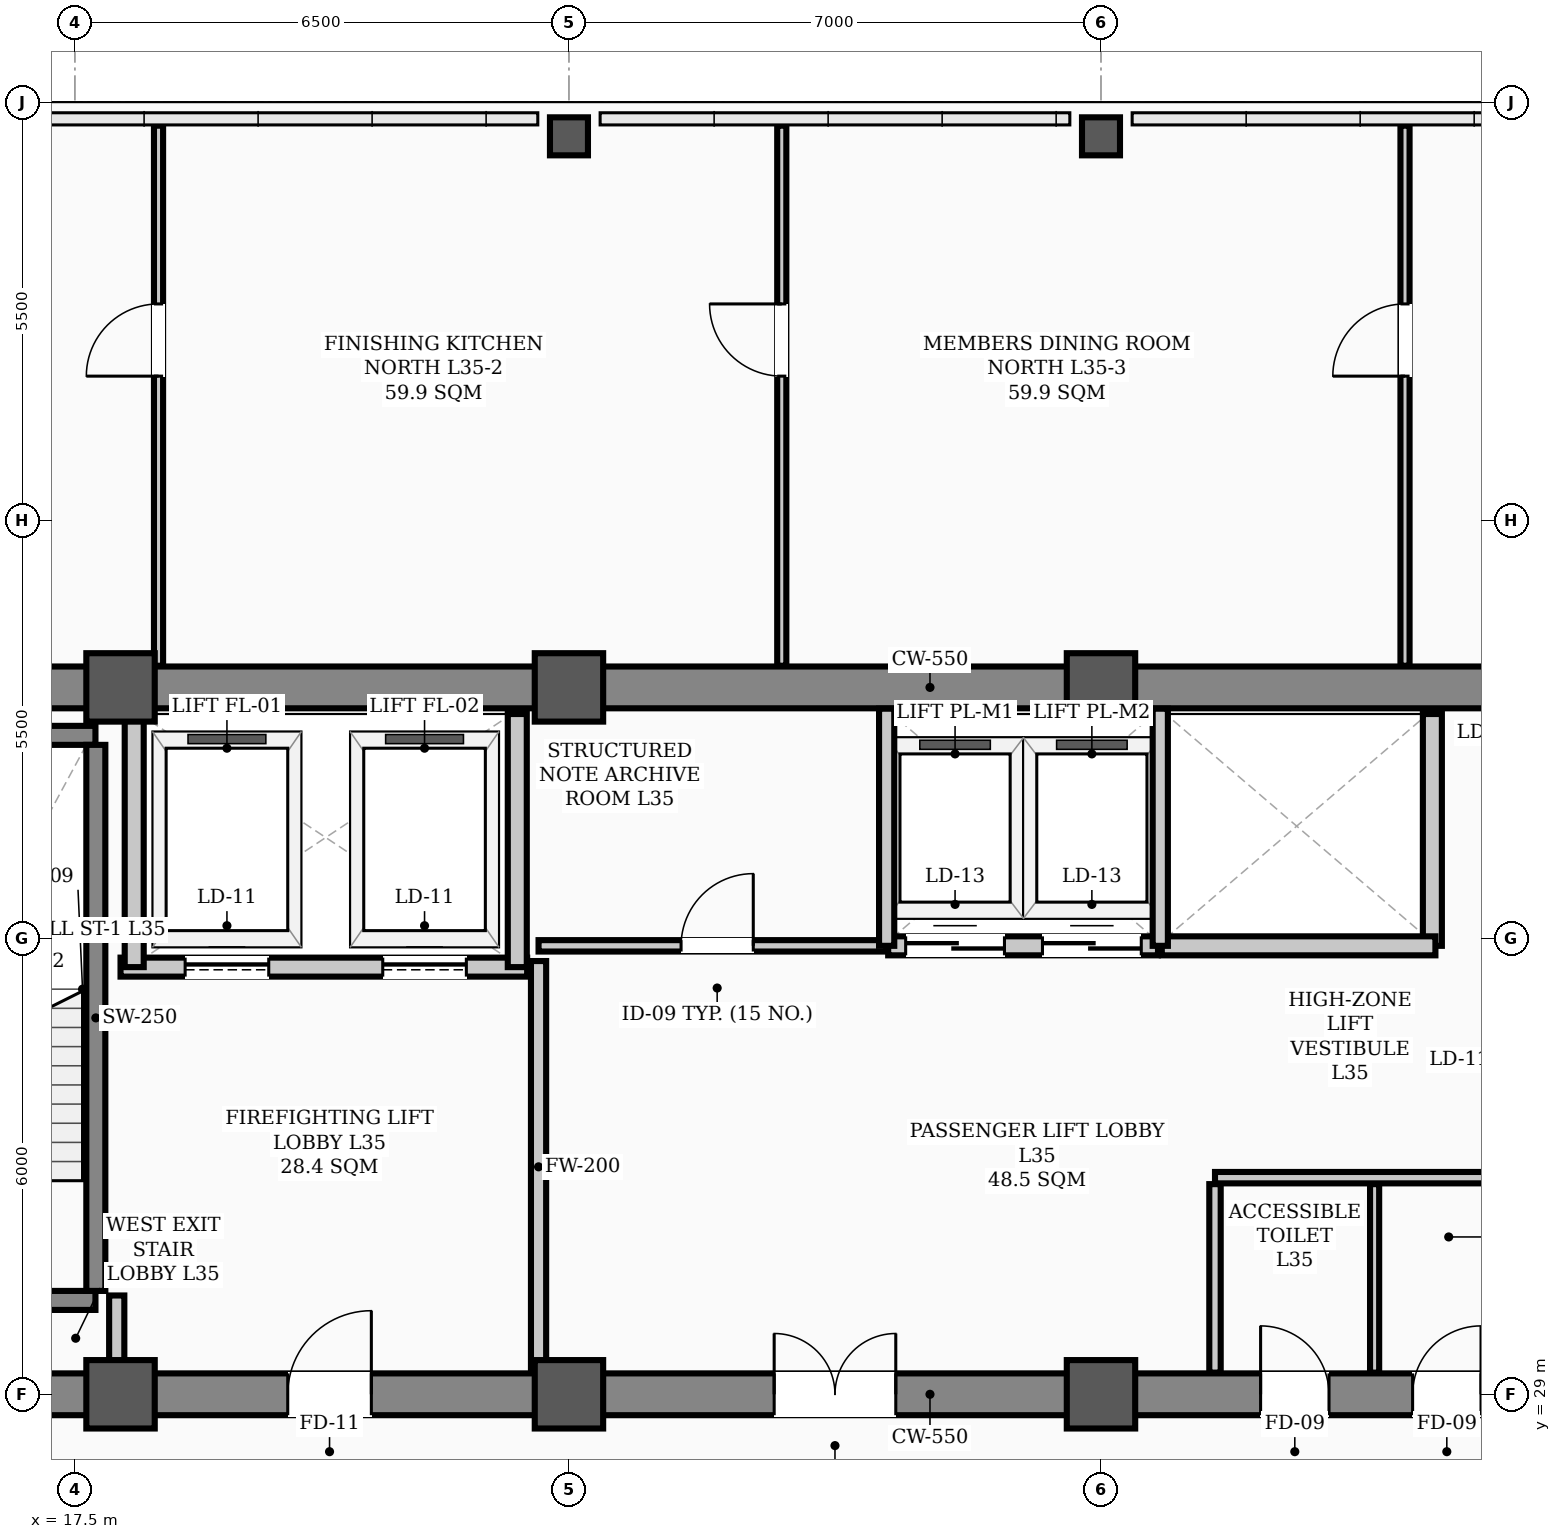
"""IFC4 building model, lengths in metres.
Left out: names, types, materials, properties, quantities, classifications, styles, units other than length and angle.
Written with IfcOpenShell. Run it as: python <this file> out.ifc"""

import sys

from ifc_helpers import new_model, si_unit, direction, frame, frame_2d, origin, origin_2d, place, context, subcontext, project, spatial, rectangle, hollow_rectangle, extrude, element, fill, save


model = new_model("IFC4")
c1 = context("Model", 3, precision=1e-05, world=origin(), true_north=direction((0.0, 1.0)))
c2 = subcontext(c1, "Body", "Model", "MODEL_VIEW")
j1 = project(units=[si_unit("LENGTHUNIT", "METRE"), si_unit("PLANEANGLEUNIT", "RADIAN")], contexts=[c1])
p1 = place(None, origin())
s1 = spatial("IfcSite", under=j1, at=p1, CompositionType="ELEMENT")
p2 = place(p1, origin())
s2 = spatial("IfcBuilding", under=s1, at=p2, CompositionType="ELEMENT")
p3 = place(p2, frame((0.0, 0.0, 142.2)))
s3 = spatial("IfcBuildingStorey", under=s2, at=p3, CompositionType="ELEMENT", Elevation=142.2)
for number, where, z_axis, x_axis in (
    (1, (18.1, 29.0, 0.0), (0.0, 0.0, 1.0), (1.0, 0.0, 0.0)),
    (2, (18.1, 38.3, 0.0), (0.0, 0.0, 1.0), (1.0, 0.0, 0.0)),
    (3, (24.0, 29.0, 0.0), (0.0, 0.0, 1.0), (1.0, 0.0, 0.0)),
    (4, (24.0, 38.3, 0.0), (0.0, 0.0, 1.0), (1.0, 0.0, 0.0)),
    (5, (31.0, 29.0, 0.0), (0.0, 0.0, 1.0), (1.0, 0.0, 0.0)),
    (6, (31.0, 38.3, 0.0), (0.0, 0.0, 1.0), (1.0, 0.0, 0.0)),
):
    element("IfcColumn", number, at=place(p3, frame(where, z_axis=z_axis, x_axis=x_axis)), inside=s3, PredefinedType="COLUMN", context=c2, shape_type="SweptSolid", body=[
        extrude(hollow_rectangle(XDim=0.9, YDim=0.9, WallThickness=0.035, InnerFilletRadius=0.017, OuterFilletRadius=0.052, at=origin_2d()), origin(), (0.0, 0.0, 1.0), 3.9),
    ])
for number, where, z_axis, x_axis in (
    (7, (24.0, 45.55, 0.0), (0.0, 0.0, 1.0), (1.0, 0.0, 0.0)),
    (8, (31.0, 45.55, 0.0), (0.0, 0.0, 1.0), (1.0, 0.0, 0.0)),
):
    element("IfcColumn", number, at=place(p3, frame(where, z_axis=z_axis, x_axis=x_axis)), inside=s3, PredefinedType="COLUMN", context=c2, shape_type="SweptSolid", body=[
        extrude(hollow_rectangle(XDim=0.5, YDim=0.5, WallThickness=0.024, InnerFilletRadius=0.012, OuterFilletRadius=0.036, at=origin_2d()), origin(), (0.0, 0.0, 1.0), 3.9),
    ])
p4 = place(p3, frame((13.5, 29.0, 0.0), z_axis=(0.0, 0.0, 1.0), x_axis=(1.0, 0.0, 0.0)))
e9 = element("IfcWall", 9, at=p4, inside=s3, PredefinedType="SHEAR", context=c2, shape_type="SweptSolid", body=[
    extrude(rectangle(XDim=30.5, YDim=0.55, at=frame_2d((15.25, 0.0))), origin(), (0.0, 0.0, 1.0), 3.72),
])
p5 = place(p4, frame((1.75, 0.0, 0.0)))
e10 = element("IfcOpeningElement", 10, at=p5, cuts=e9, PredefinedType="OPENING", context=c2, shape_type="SweptSolid", body=[
    extrude(rectangle(XDim=1.1, YDim=2.08, at=frame_2d((0.55, 1.04))), frame((0.0, 0.285, 0.0), z_axis=(0.0, -1.0, 0.0), x_axis=(1.0, 0.0, 0.0)), (0.0, 0.0, 1.0), 0.57),
])
p6 = place(p4, frame((26.7, 0.0, 0.0)))
e11 = element("IfcOpeningElement", 11, at=p6, cuts=e9, PredefinedType="OPENING", context=c2, shape_type="SweptSolid", body=[
    extrude(rectangle(XDim=1.1, YDim=2.08, at=frame_2d((0.55, 1.04))), frame((0.0, 0.285, 0.0), z_axis=(0.0, -1.0, 0.0), x_axis=(1.0, 0.0, 0.0)), (0.0, 0.0, 1.0), 0.57),
])
p7 = place(p4, frame((6.8, 0.0, 0.0)))
e12 = element("IfcOpeningElement", 12, at=p7, cuts=e9, PredefinedType="OPENING", context=c2, shape_type="SweptSolid", body=[
    extrude(rectangle(XDim=1.1, YDim=2.08, at=frame_2d((0.55, 1.04))), frame((0.0, 0.285, 0.0), z_axis=(0.0, -1.0, 0.0), x_axis=(1.0, 0.0, 0.0)), (0.0, 0.0, 1.0), 0.57),
])
p8 = place(p4, frame((13.2, 0.0, 0.0)))
e13 = element("IfcOpeningElement", 13, at=p8, cuts=e9, PredefinedType="OPENING", context=c2, shape_type="SweptSolid", body=[
    extrude(rectangle(XDim=1.6, YDim=2.08, at=frame_2d((0.8, 1.04))), frame((0.0, 0.285, 0.0), z_axis=(0.0, -1.0, 0.0), x_axis=(1.0, 0.0, 0.0)), (0.0, 0.0, 1.0), 0.57),
])
p9 = place(p4, frame((19.6, 0.0, 0.0)))
e14 = element("IfcOpeningElement", 14, at=p9, cuts=e9, PredefinedType="OPENING", context=c2, shape_type="SweptSolid", body=[
    extrude(rectangle(XDim=0.9, YDim=2.08, at=frame_2d((0.45, 1.04))), frame((0.0, 0.285, 0.0), z_axis=(0.0, -1.0, 0.0), x_axis=(1.0, 0.0, 0.0)), (0.0, 0.0, 1.0), 0.57),
])
p10 = place(p4, frame((21.6, 0.0, 0.0)))
e15 = element("IfcOpeningElement", 15, at=p10, cuts=e9, PredefinedType="OPENING", context=c2, shape_type="SweptSolid", body=[
    extrude(rectangle(XDim=0.9, YDim=2.08, at=frame_2d((0.45, 1.04))), frame((0.0, 0.285, 0.0), z_axis=(0.0, -1.0, 0.0), x_axis=(1.0, 0.0, 0.0)), (0.0, 0.0, 1.0), 0.57),
])
p11 = place(p3, frame((13.5, 38.3, 0.0), z_axis=(0.0, 0.0, 1.0), x_axis=(1.0, 0.0, 0.0)))
e16 = element("IfcWall", 16, at=p11, inside=s3, PredefinedType="SHEAR", context=c2, shape_type="SweptSolid", body=[
    extrude(rectangle(XDim=30.5, YDim=0.55, at=frame_2d((15.25, 0.0))), origin(), (0.0, 0.0, 1.0), 3.72),
])
p12 = place(p3, frame((14.43, 30.235, 0.0), z_axis=(0.0, 0.0, 1.0), x_axis=(1.0, 0.0, 0.0)))
e17 = element("IfcWall", 17, at=p12, inside=s3, PredefinedType="STANDARD", context=c2, shape_type="SweptSolid", body=[
    extrude(rectangle(XDim=3.34, YDim=0.25, at=frame_2d((1.67, 0.0))), origin(), (0.0, 0.0, 1.0), 3.72),
])
p13 = place(p12, frame((1.1, 0.0, 0.0)))
e18 = element("IfcOpeningElement", 18, at=p13, cuts=e17, PredefinedType="OPENING", context=c2, shape_type="SweptSolid", body=[
    extrude(rectangle(XDim=1.1, YDim=2.08, at=frame_2d((0.55, 1.04))), frame((0.0, 0.135, 0.0), z_axis=(0.0, -1.0, 0.0), x_axis=(1.0, 0.0, 0.0)), (0.0, 0.0, 1.0), 0.27),
])
p14 = place(p3, frame((14.43, 37.669, 0.0), z_axis=(0.0, 0.0, 1.0), x_axis=(1.0, 0.0, 0.0)))
e19 = element("IfcWall", 19, at=p14, inside=s3, PredefinedType="STANDARD", context=c2, shape_type="SweptSolid", body=[
    extrude(rectangle(XDim=3.34, YDim=0.25, at=frame_2d((1.67, 0.0))), origin(), (0.0, 0.0, 1.0), 3.72),
])
p15 = place(p3, frame((17.775, 30.36, 0.0), z_axis=(0.0, 0.0, 1.0), x_axis=(0.0, 1.0, 0.0)))
e20 = element("IfcWall", 20, at=p15, inside=s3, PredefinedType="STANDARD", context=c2, shape_type="SweptSolid", body=[
    extrude(rectangle(XDim=7.184, YDim=0.25, at=frame_2d((3.592, 0.0))), origin(), (0.0, 0.0, 1.0), 3.72),
])
p16 = place(p3, frame((18.1, 34.62, 0.0), z_axis=(0.0, 0.0, 1.0), x_axis=(1.0, 0.0, 0.0)))
e21 = element("IfcWall", 21, at=p16, inside=s3, PredefinedType="STANDARD", context=c2, shape_type="SweptSolid", body=[
    extrude(rectangle(XDim=5.35, YDim=0.25, at=frame_2d((2.675, 0.0))), origin(), (0.0, 0.0, 1.0), 3.72),
])
p17 = place(p16, frame((0.85, 0.0, 0.0)))
e22 = element("IfcOpeningElement", 22, at=p17, cuts=e21, PredefinedType="OPENING", context=c2, shape_type="SweptSolid", body=[
    extrude(rectangle(XDim=1.1, YDim=2.08, at=frame_2d((0.55, 1.04))), frame((0.0, 0.135, 0.0), z_axis=(0.0, -1.0, 0.0), x_axis=(1.0, 0.0, 0.0)), (0.0, 0.0, 1.0), 0.27),
])
p18 = place(p16, frame((3.45, 0.0, 0.0)))
e23 = element("IfcOpeningElement", 23, at=p18, cuts=e21, PredefinedType="OPENING", context=c2, shape_type="SweptSolid", body=[
    extrude(rectangle(XDim=1.1, YDim=2.08, at=frame_2d((0.55, 1.04))), frame((0.0, 0.135, 0.0), z_axis=(0.0, -1.0, 0.0), x_axis=(1.0, 0.0, 0.0)), (0.0, 0.0, 1.0), 0.27),
])
for number, where, z_axis, x_axis in (
    (24, (18.28, 34.62, 0.0), (0.0, 0.0, 1.0), (0.0, 1.0, 0.0)),
    (25, (23.32, 34.62, 0.0), (0.0, 0.0, 1.0), (0.0, 1.0, 0.0)),
):
    element("IfcWall", number, at=place(p3, frame(where, z_axis=z_axis, x_axis=x_axis)), inside=s3, PredefinedType="STANDARD", context=c2, shape_type="SweptSolid", body=[
        extrude(rectangle(XDim=3.33, YDim=0.25, at=frame_2d((1.665, 0.0))), origin(), (0.0, 0.0, 1.0), 3.3),
    ])
p19 = place(p3, frame((35.36, 34.9, 0.0), z_axis=(0.0, 0.0, 1.0), x_axis=(0.0, 1.0, 0.0)))
e26 = element("IfcWall", 26, at=p19, inside=s3, PredefinedType="STANDARD", context=c2, shape_type="SweptSolid", body=[
    extrude(rectangle(XDim=3.05, YDim=0.25, at=frame_2d((1.525, 0.0))), origin(), (0.0, 0.0, 1.0), 3.3),
])
p20 = place(p3, frame((28.2, 34.9, 0.0), z_axis=(0.0, 0.0, 1.0), x_axis=(1.0, 0.0, 0.0)))
e27 = element("IfcWall", 27, at=p20, inside=s3, PredefinedType="STANDARD", context=c2, shape_type="SweptSolid", body=[
    extrude(rectangle(XDim=3.55, YDim=0.25, at=frame_2d((1.775, 0.0))), origin(), (0.0, 0.0, 1.0), 3.72),
])
p21 = place(p20, frame((0.23, 0.0, 0.0)))
e28 = element("IfcOpeningElement", 28, at=p21, cuts=e27, PredefinedType="OPENING", context=c2, shape_type="SweptSolid", body=[
    extrude(rectangle(XDim=1.3, YDim=2.08, at=frame_2d((0.65, 1.04))), frame((0.0, 0.135, 0.0), z_axis=(0.0, -1.0, 0.0), x_axis=(1.0, 0.0, 0.0)), (0.0, 0.0, 1.0), 0.27),
])
p22 = place(p20, frame((2.03, 0.0, 0.0)))
e29 = element("IfcOpeningElement", 29, at=p22, cuts=e27, PredefinedType="OPENING", context=c2, shape_type="SweptSolid", body=[
    extrude(rectangle(XDim=1.3, YDim=2.08, at=frame_2d((0.65, 1.04))), frame((0.0, 0.135, 0.0), z_axis=(0.0, -1.0, 0.0), x_axis=(1.0, 0.0, 0.0)), (0.0, 0.0, 1.0), 0.27),
])
p23 = place(p3, frame((31.8, 34.9, 0.0), z_axis=(0.0, 0.0, 1.0), x_axis=(1.0, 0.0, 0.0)))
e30 = element("IfcWall", 30, at=p23, inside=s3, PredefinedType="STANDARD", context=c2, shape_type="SweptSolid", body=[
    extrude(rectangle(XDim=3.6, YDim=0.25, at=frame_2d((1.8, 0.0))), origin(), (0.0, 0.0, 1.0), 3.72),
])
p24 = place(p3, frame((23.6, 34.9, 0.0), z_axis=(0.0, 0.0, 1.0), x_axis=(1.0, 0.0, 0.0)))
e31 = element("IfcWall", 31, at=p24, inside=s3, PredefinedType="PARTITIONING", context=c2, shape_type="SweptSolid", body=[
    extrude(rectangle(XDim=4.58, YDim=0.15, at=frame_2d((2.29, 0.0))), origin(), (0.0, 0.0, 1.0), 3.72),
])
p25 = place(p24, frame((1.875, 0.0, 0.0)))
e32 = element("IfcOpeningElement", 32, at=p25, cuts=e31, PredefinedType="OPENING", context=c2, shape_type="SweptSolid", body=[
    extrude(rectangle(XDim=0.95, YDim=2.08, at=frame_2d((0.475, 1.04))), frame((0.0, 0.085, 0.0), z_axis=(0.0, -1.0, 0.0), x_axis=(1.0, 0.0, 0.0)), (0.0, 0.0, 1.0), 0.17),
])
p26 = place(p3, frame((32.5, 31.85, 0.0), z_axis=(0.0, 0.0, 1.0), x_axis=(1.0, 0.0, 0.0)))
e33 = element("IfcWall", 33, at=p26, inside=s3, PredefinedType="PARTITIONING", context=c2, shape_type="SweptSolid", body=[
    extrude(rectangle(XDim=4.1, YDim=0.15, at=frame_2d((2.05, 0.0))), origin(), (0.0, 0.0, 1.0), 3.72),
])
p27 = place(p3, frame((18.05, 29.285, 0.0), z_axis=(0.0, 0.0, 1.0), x_axis=(0.0, 1.0, 0.0)))
e34 = element("IfcWall", 34, at=p27, inside=s3, PredefinedType="STANDARD", context=c2, shape_type="SweptSolid", body=[
    extrude(rectangle(XDim=1.015, YDim=0.2, at=frame_2d((0.508, 0.0))), origin(), (0.0, 0.0, 1.0), 3.3),
])
p28 = place(p3, frame((23.6, 29.285, 0.0), z_axis=(0.0, 0.0, 1.0), x_axis=(0.0, 1.0, 0.0)))
e35 = element("IfcWall", 35, at=p28, inside=s3, PredefinedType="STANDARD", context=c2, shape_type="SweptSolid", body=[
    extrude(rectangle(XDim=5.415, YDim=0.2, at=frame_2d((2.708, 0.0))), origin(), (0.0, 0.0, 1.0), 3.1),
])
p29 = place(p3, frame((32.5, 29.285, 0.0), z_axis=(0.0, 0.0, 1.0), x_axis=(0.0, 1.0, 0.0)))
e36 = element("IfcWall", 36, at=p29, inside=s3, PredefinedType="PARTITIONING", context=c2, shape_type="SweptSolid", body=[
    extrude(rectangle(XDim=2.48, YDim=0.15, at=frame_2d((1.24, 0.0))), origin(), (0.0, 0.0, 1.0), 3.3),
])
p30 = place(p3, frame((34.6, 29.285, 0.0), z_axis=(0.0, 0.0, 1.0), x_axis=(0.0, 1.0, 0.0)))
e37 = element("IfcWall", 37, at=p30, inside=s3, PredefinedType="PARTITIONING", context=c2, shape_type="SweptSolid", body=[
    extrude(rectangle(XDim=2.48, YDim=0.12, at=frame_2d((1.24, 0.0))), origin(), (0.0, 0.0, 1.0), 3.3),
])
p31 = place(p3, frame((18.6, 38.585, 0.0), z_axis=(0.0, 0.0, 1.0), x_axis=(0.0, 1.0, 0.0)))
e38 = element("IfcWall", 38, at=p31, inside=s3, PredefinedType="PARTITIONING", context=c2, shape_type="SweptSolid", body=[
    extrude(rectangle(XDim=7.105, YDim=0.12, at=frame_2d((3.552, 0.0))), origin(), (0.0, 0.0, 1.0), 3.212),
])
p32 = place(p31, frame((3.81, 0.0, 0.0)))
e39 = element("IfcOpeningElement", 39, at=p32, cuts=e38, PredefinedType="OPENING", context=c2, shape_type="SweptSolid", body=[
    extrude(rectangle(XDim=0.95, YDim=2.08, at=frame_2d((0.475, 1.04))), frame((0.0, 0.07, 0.0), z_axis=(0.0, -1.0, 0.0), x_axis=(1.0, 0.0, 0.0)), (0.0, 0.0, 1.0), 0.14),
])
p33 = place(p3, frame((26.8, 38.585, 0.0), z_axis=(0.0, 0.0, 1.0), x_axis=(0.0, 1.0, 0.0)))
e40 = element("IfcWall", 40, at=p33, inside=s3, PredefinedType="PARTITIONING", context=c2, shape_type="SweptSolid", body=[
    extrude(rectangle(XDim=7.105, YDim=0.12, at=frame_2d((3.552, 0.0))), origin(), (0.0, 0.0, 1.0), 3.212),
])
p34 = place(p33, frame((3.81, 0.0, 0.0)))
e41 = element("IfcOpeningElement", 41, at=p34, cuts=e40, PredefinedType="OPENING", context=c2, shape_type="SweptSolid", body=[
    extrude(rectangle(XDim=0.95, YDim=2.08, at=frame_2d((0.475, 1.04))), frame((0.0, 0.07, 0.0), z_axis=(0.0, -1.0, 0.0), x_axis=(1.0, 0.0, 0.0)), (0.0, 0.0, 1.0), 0.14),
])
p35 = place(p3, frame((35.0, 38.585, 0.0), z_axis=(0.0, 0.0, 1.0), x_axis=(0.0, 1.0, 0.0)))
e42 = element("IfcWall", 42, at=p35, inside=s3, PredefinedType="PARTITIONING", context=c2, shape_type="SweptSolid", body=[
    extrude(rectangle(XDim=7.105, YDim=0.12, at=frame_2d((3.552, 0.0))), origin(), (0.0, 0.0, 1.0), 3.212),
])
p36 = place(p35, frame((3.81, 0.0, 0.0)))
e43 = element("IfcOpeningElement", 43, at=p36, cuts=e42, PredefinedType="OPENING", context=c2, shape_type="SweptSolid", body=[
    extrude(rectangle(XDim=0.95, YDim=2.08, at=frame_2d((0.475, 1.04))), frame((0.0, 0.07, 0.0), z_axis=(0.0, -1.0, 0.0), x_axis=(1.0, 0.0, 0.0)), (0.0, 0.0, 1.0), 0.14),
])
for number, where, z_axis, x_axis in (
    (44, (28.18, 34.9, 0.0), (0.0, 0.0, 1.0), (0.0, 1.0, 0.0)),
    (45, (31.78, 34.9, 0.0), (0.0, 0.0, 1.0), (0.0, 1.0, 0.0)),
):
    element("IfcWall", number, at=place(p3, frame(where, z_axis=z_axis, x_axis=x_axis)), inside=s3, PredefinedType="STANDARD", context=c2, shape_type="SweptSolid", body=[
        extrude(rectangle(XDim=3.12, YDim=0.2, at=frame_2d((1.56, 0.0))), origin(), (0.0, 0.0, 1.0), 3.3),
    ])
p37 = place(p7, origin())
e46 = element("IfcDoor", 46, at=p37, inside=s3, OperationType="SINGLE_SWING_RIGHT", PredefinedType="DOOR", context=c2, shape_type="SweptSolid", body=[
    extrude(rectangle(XDim=1.1, YDim=2.08, at=frame_2d((0.55, 1.04))), frame((0.0, 0.025, 0.0), z_axis=(0.0, -1.0, 0.0), x_axis=(1.0, 0.0, 0.0)), (0.0, 0.0, 1.0), 0.05),
])
fill(e12, e46)
p38 = place(p8, origin())
e47 = element("IfcDoor", 47, at=p38, inside=s3, OperationType="DOUBLE_DOOR_SINGLE_SWING", PredefinedType="DOOR", context=c2, shape_type="SweptSolid", body=[
    extrude(rectangle(XDim=1.6, YDim=2.08, at=frame_2d((0.8, 1.04))), frame((0.0, 0.025, 0.0), z_axis=(0.0, -1.0, 0.0), x_axis=(1.0, 0.0, 0.0)), (0.0, 0.0, 1.0), 0.05),
])
fill(e13, e47)
p39 = place(p25, origin())
e48 = element("IfcDoor", 48, at=p39, inside=s3, OperationType="SINGLE_SWING_RIGHT", PredefinedType="DOOR", context=c2, shape_type="SweptSolid", body=[
    extrude(rectangle(XDim=0.95, YDim=2.08, at=frame_2d((0.475, 1.04))), frame((0.0, 0.025, 0.0), z_axis=(0.0, -1.0, 0.0), x_axis=(1.0, 0.0, 0.0)), (0.0, 0.0, 1.0), 0.05),
])
fill(e32, e48)
p40 = place(p9, origin())
e49 = element("IfcDoor", 49, at=p40, inside=s3, OperationType="SINGLE_SWING_LEFT", PredefinedType="DOOR", context=c2, shape_type="SweptSolid", body=[
    extrude(rectangle(XDim=0.9, YDim=2.08, at=frame_2d((0.45, 1.04))), frame((0.0, 0.025, 0.0), z_axis=(0.0, -1.0, 0.0), x_axis=(1.0, 0.0, 0.0)), (0.0, 0.0, 1.0), 0.05),
])
fill(e14, e49)
p41 = place(p10, origin())
e50 = element("IfcDoor", 50, at=p41, inside=s3, OperationType="SINGLE_SWING_RIGHT", PredefinedType="DOOR", context=c2, shape_type="SweptSolid", body=[
    extrude(rectangle(XDim=0.9, YDim=2.08, at=frame_2d((0.45, 1.04))), frame((0.0, 0.025, 0.0), z_axis=(0.0, -1.0, 0.0), x_axis=(1.0, 0.0, 0.0)), (0.0, 0.0, 1.0), 0.05),
])
fill(e15, e50)
p42 = place(p32, origin())
e51 = element("IfcDoor", 51, at=p42, inside=s3, OperationType="SINGLE_SWING_LEFT", PredefinedType="DOOR", context=c2, shape_type="SweptSolid", body=[
    extrude(rectangle(XDim=0.95, YDim=2.08, at=frame_2d((0.475, 1.04))), frame((0.0, 0.025, 0.0), z_axis=(0.0, -1.0, 0.0), x_axis=(1.0, 0.0, 0.0)), (0.0, 0.0, 1.0), 0.05),
])
fill(e39, e51)
p43 = place(p34, origin())
e52 = element("IfcDoor", 52, at=p43, inside=s3, OperationType="SINGLE_SWING_RIGHT", PredefinedType="DOOR", context=c2, shape_type="SweptSolid", body=[
    extrude(rectangle(XDim=0.95, YDim=2.08, at=frame_2d((0.475, 1.04))), frame((0.0, 0.025, 0.0), z_axis=(0.0, -1.0, 0.0), x_axis=(1.0, 0.0, 0.0)), (0.0, 0.0, 1.0), 0.05),
])
fill(e41, e52)
p44 = place(p36, origin())
e53 = element("IfcDoor", 53, at=p44, inside=s3, OperationType="SINGLE_SWING_LEFT", PredefinedType="DOOR", context=c2, shape_type="SweptSolid", body=[
    extrude(rectangle(XDim=0.95, YDim=2.08, at=frame_2d((0.475, 1.04))), frame((0.0, 0.025, 0.0), z_axis=(0.0, -1.0, 0.0), x_axis=(1.0, 0.0, 0.0)), (0.0, 0.0, 1.0), 0.05),
])
fill(e43, e53)
p45 = place(p17, origin())
e54 = element("IfcDoor", 54, at=p45, inside=s3, OperationType="SLIDING_TO_LEFT", PredefinedType="DOOR", context=c2, shape_type="SweptSolid", body=[
    extrude(rectangle(XDim=1.1, YDim=2.08, at=frame_2d((0.55, 1.04))), frame((0.0, 0.025, 0.0), z_axis=(0.0, -1.0, 0.0), x_axis=(1.0, 0.0, 0.0)), (0.0, 0.0, 1.0), 0.05),
])
fill(e22, e54)
p46 = place(p18, origin())
e55 = element("IfcDoor", 55, at=p46, inside=s3, OperationType="SLIDING_TO_LEFT", PredefinedType="DOOR", context=c2, shape_type="SweptSolid", body=[
    extrude(rectangle(XDim=1.1, YDim=2.08, at=frame_2d((0.55, 1.04))), frame((0.0, 0.025, 0.0), z_axis=(0.0, -1.0, 0.0), x_axis=(1.0, 0.0, 0.0)), (0.0, 0.0, 1.0), 0.05),
])
fill(e23, e55)
p47 = place(p21, origin())
e56 = element("IfcDoor", 56, at=p47, inside=s3, OperationType="DOUBLE_DOOR_SLIDING", PredefinedType="DOOR", context=c2, shape_type="SweptSolid", body=[
    extrude(rectangle(XDim=1.3, YDim=2.08, at=frame_2d((0.65, 1.04))), frame((0.0, 0.025, 0.0), z_axis=(0.0, -1.0, 0.0), x_axis=(1.0, 0.0, 0.0)), (0.0, 0.0, 1.0), 0.05),
])
fill(e28, e56)
p48 = place(p22, origin())
e57 = element("IfcDoor", 57, at=p48, inside=s3, OperationType="DOUBLE_DOOR_SLIDING", PredefinedType="DOOR", context=c2, shape_type="SweptSolid", body=[
    extrude(rectangle(XDim=1.3, YDim=2.08, at=frame_2d((0.65, 1.04))), frame((0.0, 0.025, 0.0), z_axis=(0.0, -1.0, 0.0), x_axis=(1.0, 0.0, 0.0)), (0.0, 0.0, 1.0), 0.05),
])
fill(e29, e57)
save(model, sys.argv[1])
